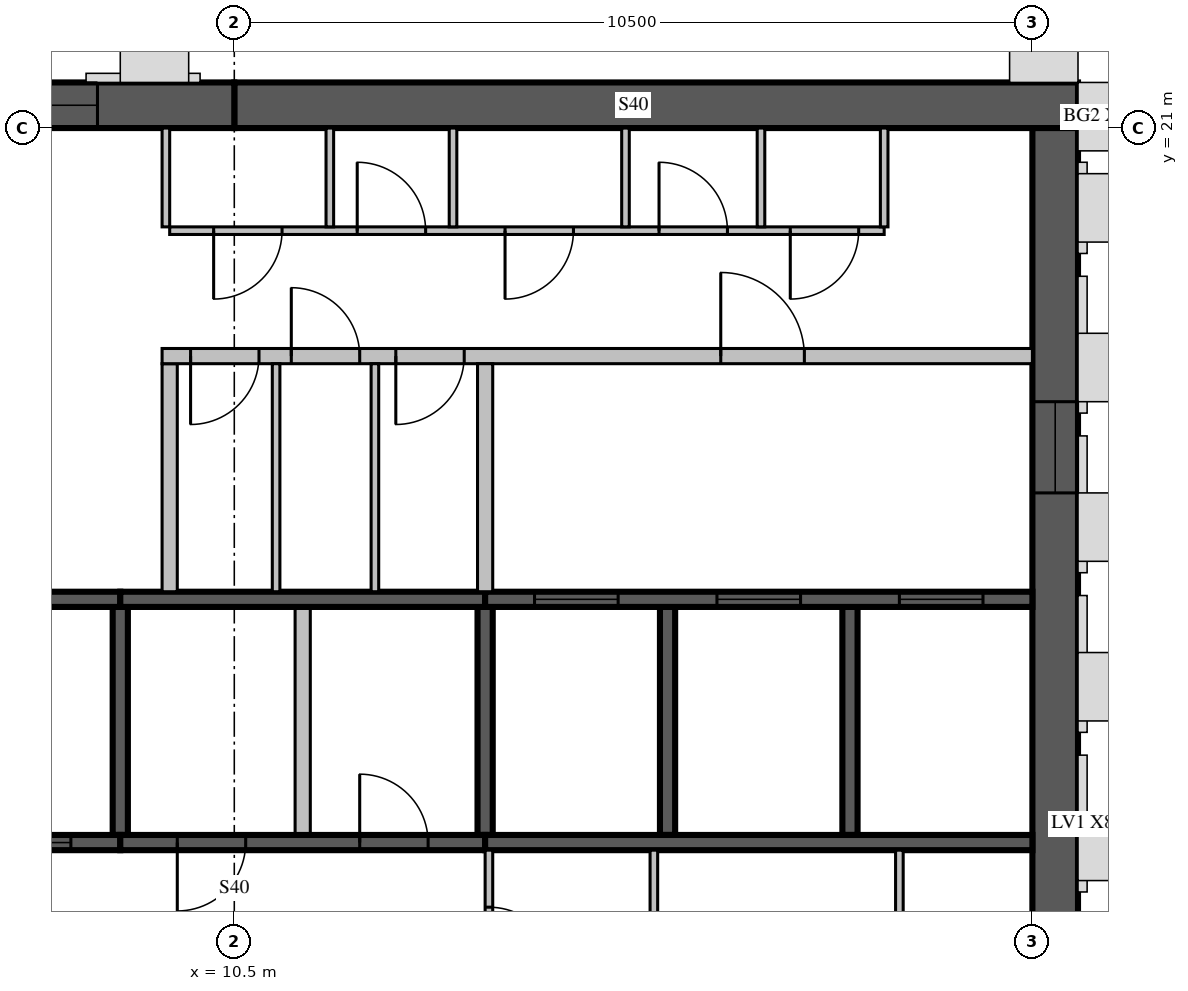
"""IFC4 building model, lengths in metres.
Left out: names, types, materials, properties, quantities, classifications, styles, units other than length and angle.
Written with IfcOpenShell. Run it as: python <this file> out.ifc"""

import sys

from ifc_helpers import new_model, si_unit, direction, frame, frame_2d, origin, place, context, subcontext, project, spatial, rectangle, extrude, source, transform, mapped, element, fill, save


model = new_model("IFC4")
c1 = context("Model", 3, precision=1e-05, world=origin(), true_north=direction((0.0, 1.0)))
c2 = subcontext(c1, "Body", "Model", "MODEL_VIEW")
j1 = project(units=[si_unit("LENGTHUNIT", "METRE"), si_unit("PLANEANGLEUNIT", "RADIAN")], contexts=[c1])
p1 = place(None, origin())
s1 = spatial("IfcSite", under=j1, at=p1, CompositionType="ELEMENT")
p2 = place(p1, origin())
s2 = spatial("IfcBuilding", under=s1, at=p2, CompositionType="ELEMENT")
p3 = place(p2, frame((0.0, 0.0, 312.5)))
s3 = spatial("IfcBuildingStorey", under=s2, at=p3, CompositionType="ELEMENT", Elevation=312.5)
m1 = source(origin(), c2, "Body", "SweptSolid", [
    extrude(rectangle(XDim=11.1, YDim=0.6, at=frame_2d((5.55, 0.0))), origin(), (0.0, 0.0, 1.0), 3.5),
])
p4 = place(p3, frame((10.5, 21.3, 0.0), z_axis=(0.0, 0.0, 1.0), x_axis=(1.0, 0.0, 0.0)))
e1 = element("IfcWall", 1, at=p4, inside=s3, PredefinedType="SHEAR", context=c2, shape_type="MappedRepresentation", body=[
    mapped(m1, transform((0.0, 0.0, 0.0), scale=1.0)),
])
m2 = source(origin(), c2, "Body", "SweptSolid", [
    extrude(rectangle(XDim=10.5, YDim=0.6, at=frame_2d((5.25, 0.0))), origin(), (0.0, 0.0, 1.0), 3.5),
])
p5 = place(p3, frame((21.3, 10.5, 0.0), z_axis=(0.0, 0.0, 1.0), x_axis=(0.0, 1.0, 0.0)))
e2 = element("IfcWall", 2, at=p5, inside=s3, PredefinedType="SHEAR", context=c2, shape_type="MappedRepresentation", body=[
    mapped(m2, transform((0.0, 0.0, 0.0), scale=1.0)),
])
m3 = source(origin(), c2, "Body", "SweptSolid", [
    extrude(rectangle(XDim=1.2, YDim=2.4, at=frame_2d((0.6, 1.2))), frame((0.0, 0.31, 0.0), z_axis=(0.0, -1.0, 0.0), x_axis=(1.0, 0.0, 0.0)), (0.0, 0.0, 1.0), 0.62),
])
p6 = place(p5, frame((5.7, 0.0, 0.6)))
e3 = element("IfcOpeningElement", 3, at=p6, cuts=e2, PredefinedType="OPENING", context=c2, shape_type="MappedRepresentation", body=[
    mapped(m3, transform((0.0, 0.0, 0.0), scale=1.0)),
])
m4 = source(origin(), c2, "Body", "SweptSolid", [
    extrude(rectangle(XDim=6.6, YDim=0.6, at=frame_2d((3.3, 0.0))), origin(), (0.0, 0.0, 1.0), 3.5),
])
p7 = place(p3, frame((3.9, 21.3, 0.0), z_axis=(0.0, 0.0, 1.0), x_axis=(1.0, 0.0, 0.0)))
e4 = element("IfcWall", 4, at=p7, inside=s3, PredefinedType="SHEAR", context=c2, shape_type="MappedRepresentation", body=[
    mapped(m4, transform((0.0, 0.0, 0.0), scale=1.0)),
])
p8 = place(p7, frame((1.5, 0.0, 0.6)))
e5 = element("IfcOpeningElement", 5, at=p8, cuts=e4, PredefinedType="OPENING", context=c2, shape_type="MappedRepresentation", body=[
    mapped(m3, transform((0.0, 0.0, 0.0), scale=1.0)),
])
p9 = place(p7, frame((3.6, 0.0, 0.6)))
e6 = element("IfcOpeningElement", 6, at=p9, cuts=e4, PredefinedType="OPENING", context=c2, shape_type="MappedRepresentation", body=[
    mapped(m3, transform((0.0, 0.0, 0.0), scale=1.0)),
])
m5 = source(origin(), c2, "Body", "SweptSolid", [
    extrude(rectangle(XDim=3.0, YDim=0.2, at=frame_2d((1.5, 0.0))), origin(), (0.0, 0.0, 1.0), 3.1),
])
for number, where, z_axis, x_axis in (
    (7, (9.0, 11.7, 0.0), (0.0, 0.0, 1.0), (0.0, 1.0, 0.0)),
    (8, (13.8, 11.7, 0.0), (0.0, 0.0, 1.0), (0.0, 1.0, 0.0)),
):
    element("IfcWall", number, at=place(p3, frame(where, z_axis=z_axis, x_axis=x_axis)), inside=s3, PredefinedType="SOLIDWALL", context=c2, shape_type="MappedRepresentation", body=[
        mapped(m5, transform((0.0, 0.0, 0.0), scale=1.0)),
    ])
m6 = source(origin(), c2, "Body", "SweptSolid", [
    extrude(rectangle(XDim=3.0, YDim=0.2, at=frame_2d((1.5, 0.0))), origin(), (0.0, 0.0, 1.0), 3.5),
])
for number, where, z_axis, x_axis in (
    (9, (16.2, 11.7, 0.0), (0.0, 0.0, 1.0), (0.0, 1.0, 0.0)),
    (10, (18.6, 11.7, 0.0), (0.0, 0.0, 1.0), (0.0, 1.0, 0.0)),
):
    element("IfcWall", number, at=place(p3, frame(where, z_axis=z_axis, x_axis=x_axis)), inside=s3, PredefinedType="SOLIDWALL", context=c2, shape_type="MappedRepresentation", body=[
        mapped(m6, transform((0.0, 0.0, 0.0), scale=1.0)),
    ])
m7 = source(origin(), c2, "Body", "SweptSolid", [
    extrude(rectangle(XDim=3.0, YDim=0.2, at=frame_2d((1.5, 0.0))), origin(), (0.0, 0.0, 1.0), 3.1),
])
p10 = place(p3, frame((11.4, 11.7, 0.0), z_axis=(0.0, 0.0, 1.0), x_axis=(0.0, 1.0, 0.0)))
e11 = element("IfcWall", 11, at=p10, inside=s3, PredefinedType="PARTITIONING", context=c2, shape_type="MappedRepresentation", body=[
    mapped(m7, transform((0.0, 0.0, 0.0), scale=1.0)),
])
m8 = source(origin(), c2, "Body", "SweptSolid", [
    extrude(rectangle(XDim=4.8, YDim=0.2, at=frame_2d((2.4, 0.0))), origin(), (0.0, 0.0, 1.0), 3.5),
])
p11 = place(p3, frame((4.2, 11.6, 0.0), z_axis=(0.0, 0.0, 1.0), x_axis=(1.0, 0.0, 0.0)))
e12 = element("IfcWall", 12, at=p11, inside=s3, PredefinedType="SOLIDWALL", context=c2, shape_type="MappedRepresentation", body=[
    mapped(m8, transform((0.0, 0.0, 0.0), scale=1.0)),
])
m9 = source(origin(), c2, "Body", "SweptSolid", [
    extrude(rectangle(XDim=1.1, YDim=2.1, at=frame_2d((0.55, 1.05))), frame((0.0, 0.11, 0.0), z_axis=(0.0, -1.0, 0.0), x_axis=(1.0, 0.0, 0.0)), (0.0, 0.0, 1.0), 0.22),
])
p12 = place(p11, frame((0.65, 0.0, 0.0)))
e13 = element("IfcOpeningElement", 13, at=p12, cuts=e12, PredefinedType="OPENING", context=c2, shape_type="MappedRepresentation", body=[
    mapped(m9, transform((0.0, 0.0, 0.0), scale=1.0)),
])
p13 = place(p11, frame((3.05, 0.0, 0.0)))
e14 = element("IfcOpeningElement", 14, at=p13, cuts=e12, PredefinedType="OPENING", context=c2, shape_type="MappedRepresentation", body=[
    mapped(m9, transform((0.0, 0.0, 0.0), scale=1.0)),
])
m10 = source(origin(), c2, "Body", "SweptSolid", [
    extrude(rectangle(XDim=4.8, YDim=0.2, at=frame_2d((2.4, 0.0))), origin(), (0.0, 0.0, 1.0), 3.1),
])
p14 = place(p3, frame((9.0, 11.6, 0.0), z_axis=(0.0, 0.0, 1.0), x_axis=(1.0, 0.0, 0.0)))
e15 = element("IfcWall", 15, at=p14, inside=s3, PredefinedType="SOLIDWALL", context=c2, shape_type="MappedRepresentation", body=[
    mapped(m10, transform((0.0, 0.0, 0.0), scale=1.0)),
])
m11 = source(origin(), c2, "Body", "SweptSolid", [
    extrude(rectangle(XDim=0.9, YDim=2.1, at=frame_2d((0.45, 1.05))), frame((0.0, 0.11, 0.0), z_axis=(0.0, -1.0, 0.0), x_axis=(1.0, 0.0, 0.0)), (0.0, 0.0, 1.0), 0.22),
])
p15 = place(p14, frame((0.75, 0.0, 0.0)))
e16 = element("IfcOpeningElement", 16, at=p15, cuts=e15, PredefinedType="OPENING", context=c2, shape_type="MappedRepresentation", body=[
    mapped(m11, transform((0.0, 0.0, 0.0), scale=1.0)),
])
p16 = place(p14, frame((3.15, 0.0, 0.0)))
e17 = element("IfcOpeningElement", 17, at=p16, cuts=e15, PredefinedType="OPENING", context=c2, shape_type="MappedRepresentation", body=[
    mapped(m11, transform((0.0, 0.0, 0.0), scale=1.0)),
])
m12 = source(origin(), c2, "Body", "SweptSolid", [
    extrude(rectangle(XDim=7.2, YDim=0.2, at=frame_2d((3.6, 0.0))), origin(), (0.0, 0.0, 1.0), 3.5),
])
p17 = place(p3, frame((13.8, 11.6, 0.0), z_axis=(0.0, 0.0, 1.0), x_axis=(1.0, 0.0, 0.0)))
e18 = element("IfcWall", 18, at=p17, inside=s3, PredefinedType="SOLIDWALL", context=c2, shape_type="MappedRepresentation", body=[
    mapped(m12, transform((0.0, 0.0, 0.0), scale=1.0)),
])
p18 = place(p3, frame((4.2, 14.8, 0.0), z_axis=(0.0, 0.0, 1.0), x_axis=(1.0, 0.0, 0.0)))
e19 = element("IfcWall", 19, at=p18, inside=s3, PredefinedType="SOLIDWALL", context=c2, shape_type="MappedRepresentation", body=[
    mapped(m8, transform((0.0, 0.0, 0.0), scale=1.0)),
])
p19 = place(p3, frame((9.0, 14.8, 0.0), z_axis=(0.0, 0.0, 1.0), x_axis=(1.0, 0.0, 0.0)))
e20 = element("IfcWall", 20, at=p19, inside=s3, PredefinedType="SOLIDWALL", context=c2, shape_type="MappedRepresentation", body=[
    mapped(m10, transform((0.0, 0.0, 0.0), scale=1.0)),
])
p20 = place(p3, frame((13.8, 14.8, 0.0), z_axis=(0.0, 0.0, 1.0), x_axis=(1.0, 0.0, 0.0)))
e21 = element("IfcWall", 21, at=p20, inside=s3, PredefinedType="SOLIDWALL", context=c2, shape_type="MappedRepresentation", body=[
    mapped(m12, transform((0.0, 0.0, 0.0), scale=1.0)),
])
p21 = place(p20, frame((0.65, 0.0, 0.0)))
e22 = element("IfcOpeningElement", 22, at=p21, cuts=e21, PredefinedType="OPENING", context=c2, shape_type="MappedRepresentation", body=[
    mapped(m9, transform((0.0, 0.0, 0.0), scale=1.0)),
])
p22 = place(p20, frame((3.05, 0.0, 0.0)))
e23 = element("IfcOpeningElement", 23, at=p22, cuts=e21, PredefinedType="OPENING", context=c2, shape_type="MappedRepresentation", body=[
    mapped(m9, transform((0.0, 0.0, 0.0), scale=1.0)),
])
p23 = place(p20, frame((5.45, 0.0, 0.0)))
e24 = element("IfcOpeningElement", 24, at=p23, cuts=e21, PredefinedType="OPENING", context=c2, shape_type="MappedRepresentation", body=[
    mapped(m9, transform((0.0, 0.0, 0.0), scale=1.0)),
])
p24 = place(p3, frame((9.65, 14.9, 0.0), z_axis=(0.0, 0.0, 1.0), x_axis=(0.0, 1.0, 0.0)))
e25 = element("IfcWall", 25, at=p24, inside=s3, PredefinedType="PARTITIONING", context=c2, shape_type="MappedRepresentation", body=[
    mapped(m7, transform((0.0, 0.0, 0.0), scale=1.0)),
])
m13 = source(origin(), c2, "Body", "SweptSolid", [
    extrude(rectangle(XDim=11.45, YDim=0.2, at=frame_2d((5.725, 0.0))), origin(), (0.0, 0.0, 1.0), 3.1),
])
p25 = place(p3, frame((9.55, 18.0, 0.0), z_axis=(0.0, 0.0, 1.0), x_axis=(1.0, 0.0, 0.0)))
e26 = element("IfcWall", 26, at=p25, inside=s3, PredefinedType="PARTITIONING", context=c2, shape_type="MappedRepresentation", body=[
    mapped(m13, transform((0.0, 0.0, 0.0), scale=1.0)),
])
p26 = place(p25, frame((0.375, 0.0, 0.0)))
e27 = element("IfcOpeningElement", 27, at=p26, cuts=e26, PredefinedType="OPENING", context=c2, shape_type="MappedRepresentation", body=[
    mapped(m11, transform((0.0, 0.0, 0.0), scale=1.0)),
])
p27 = place(p25, frame((1.7, 0.0, 0.0)))
e28 = element("IfcOpeningElement", 28, at=p27, cuts=e26, PredefinedType="OPENING", context=c2, shape_type="MappedRepresentation", body=[
    mapped(m11, transform((0.0, 0.0, 0.0), scale=1.0)),
])
p28 = place(p25, frame((3.075, 0.0, 0.0)))
e29 = element("IfcOpeningElement", 29, at=p28, cuts=e26, PredefinedType="OPENING", context=c2, shape_type="MappedRepresentation", body=[
    mapped(m11, transform((0.0, 0.0, 0.0), scale=1.0)),
])
p29 = place(p25, frame((7.35, 0.0, 0.0)))
e30 = element("IfcOpeningElement", 30, at=p29, cuts=e26, PredefinedType="OPENING", context=c2, shape_type="MappedRepresentation", body=[
    mapped(m9, transform((0.0, 0.0, 0.0), scale=1.0)),
])
m14 = source(origin(), c2, "Body", "SweptSolid", [
    extrude(rectangle(XDim=9.4, YDim=0.1, at=frame_2d((4.7, 0.0))), origin(), (0.0, 0.0, 1.0), 3.1),
])
p30 = place(p3, frame((9.65, 19.65, 0.0), z_axis=(0.0, 0.0, 1.0), x_axis=(1.0, 0.0, 0.0)))
e31 = element("IfcWall", 31, at=p30, inside=s3, PredefinedType="PARTITIONING", context=c2, shape_type="MappedRepresentation", body=[
    mapped(m14, transform((0.0, 0.0, 0.0), scale=1.0)),
])
m15 = source(origin(), c2, "Body", "SweptSolid", [
    extrude(rectangle(XDim=0.9, YDim=2.1, at=frame_2d((0.45, 1.05))), frame((0.0, 0.06, 0.0), z_axis=(0.0, -1.0, 0.0), x_axis=(1.0, 0.0, 0.0)), (0.0, 0.0, 1.0), 0.12),
])
p31 = place(p30, frame((0.578, 0.0, 0.0)))
e32 = element("IfcOpeningElement", 32, at=p31, cuts=e31, PredefinedType="OPENING", context=c2, shape_type="MappedRepresentation", body=[
    mapped(m15, transform((0.0, 0.0, 0.0), scale=1.0)),
])
p32 = place(p30, frame((2.467, 0.0, 0.0)))
e33 = element("IfcOpeningElement", 33, at=p32, cuts=e31, PredefinedType="OPENING", context=c2, shape_type="MappedRepresentation", body=[
    mapped(m15, transform((0.0, 0.0, 0.0), scale=1.0)),
])
p33 = place(p30, frame((4.412, 0.0, 0.0)))
e34 = element("IfcOpeningElement", 34, at=p33, cuts=e31, PredefinedType="OPENING", context=c2, shape_type="MappedRepresentation", body=[
    mapped(m15, transform((0.0, 0.0, 0.0), scale=1.0)),
])
p34 = place(p30, frame((6.438, 0.0, 0.0)))
e35 = element("IfcOpeningElement", 35, at=p34, cuts=e31, PredefinedType="OPENING", context=c2, shape_type="MappedRepresentation", body=[
    mapped(m15, transform((0.0, 0.0, 0.0), scale=1.0)),
])
p35 = place(p30, frame((8.165, 0.0, 0.0)))
e36 = element("IfcOpeningElement", 36, at=p35, cuts=e31, PredefinedType="OPENING", context=c2, shape_type="MappedRepresentation", body=[
    mapped(m15, transform((0.0, 0.0, 0.0), scale=1.0)),
])
m16 = source(origin(), c2, "Body", "SweptSolid", [
    extrude(rectangle(XDim=1.3, YDim=0.1, at=frame_2d((0.65, 0.0))), origin(), (0.0, 0.0, 1.0), 3.1),
])
for number, where, z_axis, x_axis in (
    (37, (11.757, 19.7, 0.0), (0.0, 0.0, 1.0), (0.0, 1.0, 0.0)),
    (38, (13.378, 19.7, 0.0), (0.0, 0.0, 1.0), (0.0, 1.0, 0.0)),
    (39, (15.647, 19.7, 0.0), (0.0, 0.0, 1.0), (0.0, 1.0, 0.0)),
    (40, (17.429, 19.7, 0.0), (0.0, 0.0, 1.0), (0.0, 1.0, 0.0)),
    (41, (9.6, 19.7, 0.0), (0.0, 0.0, 1.0), (0.0, 1.0, 0.0)),
    (42, (19.05, 19.7, 0.0), (0.0, 0.0, 1.0), (0.0, 1.0, 0.0)),
):
    element("IfcWall", number, at=place(p3, frame(where, z_axis=z_axis, x_axis=x_axis)), inside=s3, PredefinedType="PARTITIONING", context=c2, shape_type="MappedRepresentation", body=[
        mapped(m16, transform((0.0, 0.0, 0.0), scale=1.0)),
    ])
m17 = source(origin(), c2, "Body", "SweptSolid", [
    extrude(rectangle(XDim=2.5, YDim=0.1, at=frame_2d((1.25, 0.0))), origin(), (0.0, 0.0, 1.0), 3.1),
])
p36 = place(p3, frame((13.85, 9.0, 0.0), z_axis=(0.0, 0.0, 1.0), x_axis=(0.0, 1.0, 0.0)))
e43 = element("IfcWall", 43, at=p36, inside=s3, PredefinedType="PARTITIONING", context=c2, shape_type="MappedRepresentation", body=[
    mapped(m17, transform((0.0, 0.0, 0.0), scale=1.0)),
])
p37 = place(p36, frame((0.85, 0.0, 0.0)))
e44 = element("IfcOpeningElement", 44, at=p37, cuts=e43, PredefinedType="OPENING", context=c2, shape_type="MappedRepresentation", body=[
    mapped(m15, transform((0.0, 0.0, 0.0), scale=1.0)),
])
m18 = source(origin(), c2, "Body", "SweptSolid", [
    extrude(rectangle(XDim=2.4, YDim=0.1, at=frame_2d((1.2, 0.0))), origin(), (0.0, 0.0, 1.0), 3.1),
])
p38 = place(p3, frame((16.02, 9.1, 0.0), z_axis=(0.0, 0.0, 1.0), x_axis=(0.0, 1.0, 0.0)))
e45 = element("IfcWall", 45, at=p38, inside=s3, PredefinedType="PARTITIONING", context=c2, shape_type="MappedRepresentation", body=[
    mapped(m18, transform((0.0, 0.0, 0.0), scale=1.0)),
])
p39 = place(p3, frame((19.25, 9.0, 0.0), z_axis=(0.0, 0.0, 1.0), x_axis=(0.0, 1.0, 0.0)))
e46 = element("IfcWall", 46, at=p39, inside=s3, PredefinedType="PARTITIONING", context=c2, shape_type="MappedRepresentation", body=[
    mapped(m17, transform((0.0, 0.0, 0.0), scale=1.0)),
])
p40 = place(p3, frame((13.8, 14.9, 0.0), z_axis=(0.0, 0.0, 1.0), x_axis=(0.0, 1.0, 0.0)))
e47 = element("IfcWall", 47, at=p40, inside=s3, PredefinedType="PARTITIONING", context=c2, shape_type="MappedRepresentation", body=[
    mapped(m7, transform((0.0, 0.0, 0.0), scale=1.0)),
])
m19 = source(origin(), c2, "Body", "SweptSolid", [
    extrude(rectangle(XDim=3.0, YDim=0.1, at=frame_2d((1.5, 0.0))), origin(), (0.0, 0.0, 1.0), 3.1),
])
for number, where, z_axis, x_axis in (
    (48, (11.05, 14.9, 0.0), (0.0, 0.0, 1.0), (0.0, 1.0, 0.0)),
    (49, (12.35, 14.9, 0.0), (0.0, 0.0, 1.0), (0.0, 1.0, 0.0)),
):
    element("IfcWall", number, at=place(p3, frame(where, z_axis=z_axis, x_axis=x_axis)), inside=s3, PredefinedType="PARTITIONING", context=c2, shape_type="MappedRepresentation", body=[
        mapped(m19, transform((0.0, 0.0, 0.0), scale=1.0)),
    ])
m20 = source(origin(), c2, "Body", "SweptSolid", [
    extrude(rectangle(XDim=1.1, YDim=2.1, at=frame_2d((0.55, 1.05))), frame((0.0, 0.025, 0.0), z_axis=(0.0, -1.0, 0.0), x_axis=(1.0, 0.0, 0.0)), (0.0, 0.0, 1.0), 0.05),
])
p41 = place(p13, origin())
e50 = element("IfcDoor", 50, at=p41, inside=s3, OperationType="SLIDING_TO_LEFT", PredefinedType="DOOR", context=c2, shape_type="MappedRepresentation", body=[
    mapped(m20, transform((0.0, 0.0, 0.0), scale=1.0)),
])
fill(e14, e50)
m21 = source(origin(), c2, "Body", "SweptSolid", [
    extrude(rectangle(XDim=0.9, YDim=2.1, at=frame_2d((0.45, 1.05))), frame((0.0, 0.025, 0.0), z_axis=(0.0, -1.0, 0.0), x_axis=(1.0, 0.0, 0.0)), (0.0, 0.0, 1.0), 0.05),
])
p42 = place(p15, origin())
e51 = element("IfcDoor", 51, at=p42, inside=s3, OperationType="SINGLE_SWING_RIGHT", PredefinedType="DOOR", context=c2, shape_type="MappedRepresentation", body=[
    mapped(m21, transform((0.0, 0.0, 0.0), scale=1.0)),
])
fill(e16, e51)
p43 = place(p16, origin())
e52 = element("IfcDoor", 52, at=p43, inside=s3, OperationType="SINGLE_SWING_LEFT", PredefinedType="DOOR", context=c2, shape_type="MappedRepresentation", body=[
    mapped(m21, transform((0.0, 0.0, 0.0), scale=1.0)),
])
fill(e17, e52)
p44 = place(p21, origin())
e53 = element("IfcDoor", 53, at=p44, inside=s3, OperationType="SLIDING_TO_LEFT", PredefinedType="DOOR", context=c2, shape_type="MappedRepresentation", body=[
    mapped(m20, transform((0.0, 0.0, 0.0), scale=1.0)),
])
fill(e22, e53)
p45 = place(p22, origin())
e54 = element("IfcDoor", 54, at=p45, inside=s3, OperationType="SLIDING_TO_LEFT", PredefinedType="DOOR", context=c2, shape_type="MappedRepresentation", body=[
    mapped(m20, transform((0.0, 0.0, 0.0), scale=1.0)),
])
fill(e23, e54)
p46 = place(p23, origin())
e55 = element("IfcDoor", 55, at=p46, inside=s3, OperationType="SLIDING_TO_LEFT", PredefinedType="DOOR", context=c2, shape_type="MappedRepresentation", body=[
    mapped(m20, transform((0.0, 0.0, 0.0), scale=1.0)),
])
fill(e24, e55)
p47 = place(p26, origin())
e56 = element("IfcDoor", 56, at=p47, inside=s3, OperationType="SINGLE_SWING_RIGHT", PredefinedType="DOOR", context=c2, shape_type="MappedRepresentation", body=[
    mapped(m21, transform((0.0, 0.0, 0.0), scale=1.0)),
])
fill(e27, e56)
p48 = place(p27, origin())
e57 = element("IfcDoor", 57, at=p48, inside=s3, OperationType="SINGLE_SWING_LEFT", PredefinedType="DOOR", context=c2, shape_type="MappedRepresentation", body=[
    mapped(m21, transform((0.0, 0.0, 0.0), scale=1.0)),
])
fill(e28, e57)
p49 = place(p28, origin())
e58 = element("IfcDoor", 58, at=p49, inside=s3, OperationType="SINGLE_SWING_RIGHT", PredefinedType="DOOR", context=c2, shape_type="MappedRepresentation", body=[
    mapped(m21, transform((0.0, 0.0, 0.0), scale=1.0)),
])
fill(e29, e58)
p50 = place(p29, origin())
e59 = element("IfcDoor", 59, at=p50, inside=s3, OperationType="SINGLE_SWING_LEFT", PredefinedType="DOOR", context=c2, shape_type="MappedRepresentation", body=[
    mapped(m20, transform((0.0, 0.0, 0.0), scale=1.0)),
])
fill(e30, e59)
p51 = place(p31, origin())
e60 = element("IfcDoor", 60, at=p51, inside=s3, OperationType="SINGLE_SWING_RIGHT", PredefinedType="DOOR", context=c2, shape_type="MappedRepresentation", body=[
    mapped(m21, transform((0.0, 0.0, 0.0), scale=1.0)),
])
fill(e32, e60)
p52 = place(p32, origin())
e61 = element("IfcDoor", 61, at=p52, inside=s3, OperationType="SINGLE_SWING_LEFT", PredefinedType="DOOR", context=c2, shape_type="MappedRepresentation", body=[
    mapped(m21, transform((0.0, 0.0, 0.0), scale=1.0)),
])
fill(e33, e61)
p53 = place(p33, origin())
e62 = element("IfcDoor", 62, at=p53, inside=s3, OperationType="SINGLE_SWING_RIGHT", PredefinedType="DOOR", context=c2, shape_type="MappedRepresentation", body=[
    mapped(m21, transform((0.0, 0.0, 0.0), scale=1.0)),
])
fill(e34, e62)
p54 = place(p34, origin())
e63 = element("IfcDoor", 63, at=p54, inside=s3, OperationType="SINGLE_SWING_LEFT", PredefinedType="DOOR", context=c2, shape_type="MappedRepresentation", body=[
    mapped(m21, transform((0.0, 0.0, 0.0), scale=1.0)),
])
fill(e35, e63)
p55 = place(p35, origin())
e64 = element("IfcDoor", 64, at=p55, inside=s3, OperationType="SINGLE_SWING_RIGHT", PredefinedType="DOOR", context=c2, shape_type="MappedRepresentation", body=[
    mapped(m21, transform((0.0, 0.0, 0.0), scale=1.0)),
])
fill(e36, e64)
p56 = place(p37, origin())
e65 = element("IfcDoor", 65, at=p56, inside=s3, OperationType="SINGLE_SWING_RIGHT", PredefinedType="DOOR", context=c2, shape_type="MappedRepresentation", body=[
    mapped(m21, transform((0.0, 0.0, 0.0), scale=1.0)),
])
fill(e44, e65)
m22 = source(origin(), c2, "Body", "SweptSolid", [
    extrude(rectangle(XDim=1.2, YDim=2.4, at=frame_2d((0.6, 1.2))), frame((0.0, 0.03, 0.0), z_axis=(0.0, -1.0, 0.0), x_axis=(1.0, 0.0, 0.0)), (0.0, 0.0, 1.0), 0.06),
])
p57 = place(p6, origin())
e66 = element("IfcWindow", 66, at=p57, inside=s3, PartitioningType="SINGLE_PANEL", PredefinedType="WINDOW", context=c2, shape_type="MappedRepresentation", body=[
    mapped(m22, transform((0.0, 0.0, 0.0), scale=1.0)),
])
fill(e3, e66)
p58 = place(p9, origin())
e67 = element("IfcWindow", 67, at=p58, inside=s3, PartitioningType="SINGLE_PANEL", PredefinedType="WINDOW", context=c2, shape_type="MappedRepresentation", body=[
    mapped(m22, transform((0.0, 0.0, 0.0), scale=1.0)),
])
fill(e6, e67)
save(model, sys.argv[1])
